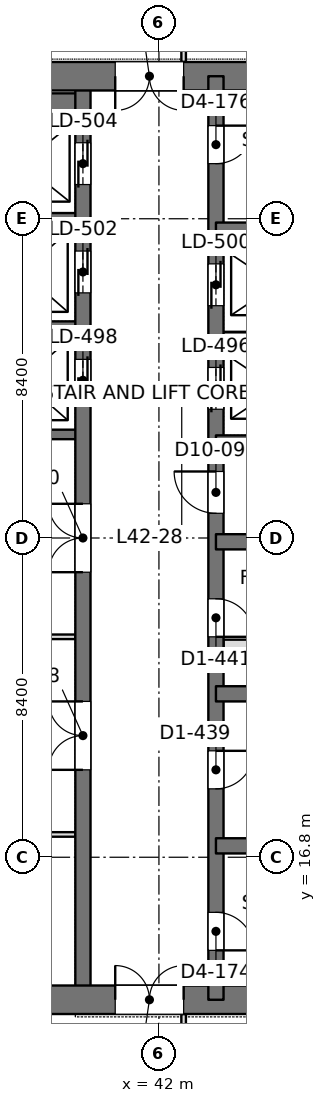
"""IFC4 building model, lengths in metres.
Left out: names, types, materials, properties, quantities, classifications, styles, units other than length and angle.
Written with IfcOpenShell. Run it as: python <this file> out.ifc"""

import sys

from ifc_helpers import new_model, si_unit, direction, frame, frame_2d, origin, place, context, subcontext, project, spatial, rectangle, extrude, element, fill, save


model = new_model("IFC4")
c1 = context("Model", 3, precision=1e-05, world=origin(), true_north=direction((0.0, 1.0)))
c2 = subcontext(c1, "Body", "Model", "MODEL_VIEW")
j1 = project(units=[si_unit("LENGTHUNIT", "METRE"), si_unit("PLANEANGLEUNIT", "RADIAN")], contexts=[c1])
p1 = place(None, origin())
s1 = spatial("IfcSite", under=j1, at=p1, CompositionType="ELEMENT")
p2 = place(p1, origin())
s2 = spatial("IfcBuilding", under=s1, at=p2, CompositionType="ELEMENT")
p3 = place(p2, frame((0.0, 0.0, 186.0)))
s3 = spatial("IfcBuildingStorey", under=s2, at=p3, CompositionType="ELEMENT", Elevation=186.0)
p4 = place(p3, frame((33.675, 13.05, 0.0), z_axis=(0.0, 0.0, 1.0), x_axis=(1.0, 0.0, 0.0)))
e1 = element("IfcWall", 1, at=p4, inside=s3, PredefinedType="SHEAR", context=c2, shape_type="SweptSolid", body=[
    extrude(rectangle(XDim=17.85, YDim=0.75, at=frame_2d((8.925, 0.0))), origin(), (0.0, 0.0, 1.0), 4.2),
])
p5 = place(p4, frame((7.175, 0.0, 0.0)))
e2 = element("IfcOpeningElement", 2, at=p5, cuts=e1, PredefinedType="OPENING", context=c2, shape_type="SweptSolid", body=[
    extrude(rectangle(XDim=1.8, YDim=2.4, at=frame_2d((0.9, 1.2))), frame((0.0, 0.385, 0.0), z_axis=(0.0, -1.0, 0.0), x_axis=(1.0, 0.0, 0.0)), (0.0, 0.0, 1.0), 0.77),
])
p6 = place(p3, frame((33.675, 37.35, 0.0), z_axis=(0.0, 0.0, 1.0), x_axis=(1.0, 0.0, 0.0)))
e3 = element("IfcWall", 3, at=p6, inside=s3, PredefinedType="SHEAR", context=c2, shape_type="SweptSolid", body=[
    extrude(rectangle(XDim=17.85, YDim=0.75, at=frame_2d((8.925, 0.0))), origin(), (0.0, 0.0, 1.0), 4.2),
])
p7 = place(p6, frame((7.175, 0.0, 0.0)))
e4 = element("IfcOpeningElement", 4, at=p7, cuts=e3, PredefinedType="OPENING", context=c2, shape_type="SweptSolid", body=[
    extrude(rectangle(XDim=1.8, YDim=2.4, at=frame_2d((0.9, 1.2))), frame((0.0, 0.385, 0.0), z_axis=(0.0, -1.0, 0.0), x_axis=(1.0, 0.0, 0.0)), (0.0, 0.0, 1.0), 0.77),
])
p8 = place(p3, frame((43.5, 13.05, 0.0), z_axis=(0.0, 0.0, 1.0), x_axis=(0.0, 1.0, 0.0)))
e5 = element("IfcWall", 5, at=p8, inside=s3, PredefinedType="SHEAR", context=c2, shape_type="SweptSolid", body=[
    extrude(rectangle(XDim=24.3, YDim=0.4, at=frame_2d((12.15, 0.0))), origin(), (0.0, 0.0, 1.0), 4.2),
])
p9 = place(p8, frame((1.3, 0.0, 0.0)))
e6 = element("IfcOpeningElement", 6, at=p9, cuts=e5, PredefinedType="OPENING", context=c2, shape_type="SweptSolid", body=[
    extrude(rectangle(XDim=1.0, YDim=2.2, at=frame_2d((0.5, 1.1))), frame((0.0, 0.21, 0.0), z_axis=(0.0, -1.0, 0.0), x_axis=(1.0, 0.0, 0.0)), (0.0, 0.0, 1.0), 0.42),
])
p10 = place(p8, frame((22.0, 0.0, 0.0)))
e7 = element("IfcOpeningElement", 7, at=p10, cuts=e5, PredefinedType="OPENING", context=c2, shape_type="SweptSolid", body=[
    extrude(rectangle(XDim=1.0, YDim=2.2, at=frame_2d((0.5, 1.1))), frame((0.0, 0.21, 0.0), z_axis=(0.0, -1.0, 0.0), x_axis=(1.0, 0.0, 0.0)), (0.0, 0.0, 1.0), 0.42),
])
p11 = place(p8, frame((5.55, 0.0, 0.0)))
e8 = element("IfcOpeningElement", 8, at=p11, cuts=e5, PredefinedType="OPENING", context=c2, shape_type="SweptSolid", body=[
    extrude(rectangle(XDim=1.0, YDim=2.2, at=frame_2d((0.5, 1.1))), frame((0.0, 0.21, 0.0), z_axis=(0.0, -1.0, 0.0), x_axis=(1.0, 0.0, 0.0)), (0.0, 0.0, 1.0), 0.42),
])
p12 = place(p8, frame((9.55, 0.0, 0.0)))
e9 = element("IfcOpeningElement", 9, at=p12, cuts=e5, PredefinedType="OPENING", context=c2, shape_type="SweptSolid", body=[
    extrude(rectangle(XDim=1.0, YDim=2.2, at=frame_2d((0.5, 1.1))), frame((0.0, 0.21, 0.0), z_axis=(0.0, -1.0, 0.0), x_axis=(1.0, 0.0, 0.0)), (0.0, 0.0, 1.0), 0.42),
])
p13 = place(p8, frame((12.8, 0.0, 0.0)))
e10 = element("IfcOpeningElement", 10, at=p13, cuts=e5, PredefinedType="OPENING", context=c2, shape_type="SweptSolid", body=[
    extrude(rectangle(XDim=1.1, YDim=2.2, at=frame_2d((0.55, 1.1))), frame((0.0, 0.21, 0.0), z_axis=(0.0, -1.0, 0.0), x_axis=(1.0, 0.0, 0.0)), (0.0, 0.0, 1.0), 0.42),
])
p14 = place(p8, frame((15.538, 0.0, 0.0)))
e11 = element("IfcOpeningElement", 11, at=p14, cuts=e5, PredefinedType="OPENING", context=c2, shape_type="SweptSolid", body=[
    extrude(rectangle(XDim=1.1, YDim=2.2, at=frame_2d((0.55, 1.1))), frame((0.0, 0.21, 0.0), z_axis=(0.0, -1.0, 0.0), x_axis=(1.0, 0.0, 0.0)), (0.0, 0.0, 1.0), 0.42),
])
p15 = place(p8, frame((18.262, 0.0, 0.0)))
e12 = element("IfcOpeningElement", 12, at=p15, cuts=e5, PredefinedType="OPENING", context=c2, shape_type="SweptSolid", body=[
    extrude(rectangle(XDim=1.1, YDim=2.2, at=frame_2d((0.55, 1.1))), frame((0.0, 0.21, 0.0), z_axis=(0.0, -1.0, 0.0), x_axis=(1.0, 0.0, 0.0)), (0.0, 0.0, 1.0), 0.42),
])
p16 = place(p3, frame((40.0, 13.05, 0.0), z_axis=(0.0, 0.0, 1.0), x_axis=(0.0, 1.0, 0.0)))
e13 = element("IfcWall", 13, at=p16, inside=s3, PredefinedType="SHEAR", context=c2, shape_type="SweptSolid", body=[
    extrude(rectangle(XDim=24.3, YDim=0.4, at=frame_2d((12.15, 0.0))), origin(), (0.0, 0.0, 1.0), 4.2),
])
p17 = place(p16, frame((15.75, 0.0, 0.0)))
e14 = element("IfcOpeningElement", 14, at=p17, cuts=e13, PredefinedType="OPENING", context=c2, shape_type="SweptSolid", body=[
    extrude(rectangle(XDim=1.1, YDim=2.2, at=frame_2d((0.55, 1.1))), frame((0.0, 0.21, 0.0), z_axis=(0.0, -1.0, 0.0), x_axis=(1.0, 0.0, 0.0)), (0.0, 0.0, 1.0), 0.42),
])
p18 = place(p16, frame((18.6, 0.0, 0.0)))
e15 = element("IfcOpeningElement", 15, at=p18, cuts=e13, PredefinedType="OPENING", context=c2, shape_type="SweptSolid", body=[
    extrude(rectangle(XDim=1.1, YDim=2.2, at=frame_2d((0.55, 1.1))), frame((0.0, 0.21, 0.0), z_axis=(0.0, -1.0, 0.0), x_axis=(1.0, 0.0, 0.0)), (0.0, 0.0, 1.0), 0.42),
])
p19 = place(p16, frame((21.45, 0.0, 0.0)))
e16 = element("IfcOpeningElement", 16, at=p19, cuts=e13, PredefinedType="OPENING", context=c2, shape_type="SweptSolid", body=[
    extrude(rectangle(XDim=1.1, YDim=2.2, at=frame_2d((0.55, 1.1))), frame((0.0, 0.21, 0.0), z_axis=(0.0, -1.0, 0.0), x_axis=(1.0, 0.0, 0.0)), (0.0, 0.0, 1.0), 0.42),
])
p20 = place(p16, frame((6.05, 0.0, 0.0)))
e17 = element("IfcOpeningElement", 17, at=p20, cuts=e13, PredefinedType="OPENING", context=c2, shape_type="SweptSolid", body=[
    extrude(rectangle(XDim=1.8, YDim=2.4, at=frame_2d((0.9, 1.2))), frame((0.0, 0.21, 0.0), z_axis=(0.0, -1.0, 0.0), x_axis=(1.0, 0.0, 0.0)), (0.0, 0.0, 1.0), 0.42),
])
p21 = place(p16, frame((11.25, 0.0, 0.0)))
e18 = element("IfcOpeningElement", 18, at=p21, cuts=e13, PredefinedType="OPENING", context=c2, shape_type="SweptSolid", body=[
    extrude(rectangle(XDim=1.8, YDim=2.4, at=frame_2d((0.9, 1.2))), frame((0.0, 0.21, 0.0), z_axis=(0.0, -1.0, 0.0), x_axis=(1.0, 0.0, 0.0)), (0.0, 0.0, 1.0), 0.42),
])
for number, where, z_axis, x_axis in (
    (19, (51.15, 17.1, 0.0), (0.0, 0.0, 1.0), (-1.0, 0.0, 0.0)),
    (20, (51.15, 21.1, 0.0), (0.0, 0.0, 1.0), (-1.0, 0.0, 0.0)),
    (21, (51.15, 25.1, 0.0), (0.0, 0.0, 1.0), (-1.0, 0.0, 0.0)),
    (22, (51.15, 27.7, 0.0), (0.0, 0.0, 1.0), (-1.0, 0.0, 0.0)),
    (23, (51.15, 33.3, 0.0), (0.0, 0.0, 1.0), (-1.0, 0.0, 0.0)),
):
    element("IfcWall", number, at=place(p3, frame(where, z_axis=z_axis, x_axis=x_axis)), inside=s3, PredefinedType="SHEAR", context=c2, shape_type="SweptSolid", body=[
        extrude(rectangle(XDim=7.65, YDim=0.4, at=frame_2d((3.825, 0.0))), origin(), (0.0, 0.0, 1.0), 4.2),
    ])
p22 = place(p3, frame((46.7, 30.5, 0.0), z_axis=(0.0, 0.0, 1.0), x_axis=(-1.0, 0.0, 0.0)))
e24 = element("IfcWall", 24, at=p22, inside=s3, PredefinedType="SHEAR", context=c2, shape_type="SweptSolid", body=[
    extrude(rectangle(XDim=3.2, YDim=0.25, at=frame_2d((1.6, 0.0))), origin(), (0.0, 0.0, 1.0), 4.2),
])
p23 = place(p3, frame((40.0, 27.925, 0.0), z_axis=(0.0, 0.0, 1.0), x_axis=(-1.0, 0.0, 0.0)))
e25 = element("IfcWall", 25, at=p23, inside=s3, PredefinedType="SHEAR", context=c2, shape_type="SweptSolid", body=[
    extrude(rectangle(XDim=5.95, YDim=0.25, at=frame_2d((2.975, 0.0))), origin(), (0.0, 0.0, 1.0), 4.2),
])
for number, where, z_axis, x_axis in (
    (26, (40.0, 30.775, 0.0), (0.0, 0.0, 1.0), (-1.0, 0.0, 0.0)),
    (27, (40.0, 33.625, 0.0), (0.0, 0.0, 1.0), (-1.0, 0.0, 0.0)),
):
    element("IfcWall", number, at=place(p3, frame(where, z_axis=z_axis, x_axis=x_axis)), inside=s3, PredefinedType="SHEAR", context=c2, shape_type="SweptSolid", body=[
        extrude(rectangle(XDim=3.2, YDim=0.25, at=frame_2d((1.6, 0.0))), origin(), (0.0, 0.0, 1.0), 4.2),
    ])
p24 = place(p3, frame((40.0, 36.625, 0.0), z_axis=(0.0, 0.0, 1.0), x_axis=(-1.0, 0.0, 0.0)))
e28 = element("IfcWall", 28, at=p24, inside=s3, PredefinedType="SHEAR", context=c2, shape_type="SweptSolid", body=[
    extrude(rectangle(XDim=3.2, YDim=0.55, at=frame_2d((1.6, 0.0))), origin(), (0.0, 0.0, 1.0), 4.2),
])
p25 = place(p3, frame((33.898, 17.4, 0.0), z_axis=(0.0, 0.0, 1.0), x_axis=(1.0, 0.0, 0.0)))
e29 = element("IfcWall", 29, at=p25, inside=s3, PredefinedType="PARTITIONING", context=c2, shape_type="SweptSolid", body=[
    extrude(rectangle(XDim=5.904, YDim=0.12, at=frame_2d((2.952, 0.0))), origin(), (0.0, 0.0, 1.0), 3.55),
])
p26 = place(p3, frame((34.749, 22.6, 0.0), z_axis=(0.0, 0.0, 1.0), x_axis=(1.0, 0.0, 0.0)))
e30 = element("IfcWall", 30, at=p26, inside=s3, PredefinedType="PARTITIONING", context=c2, shape_type="SweptSolid", body=[
    extrude(rectangle(XDim=5.053, YDim=0.12, at=frame_2d((2.526, 0.0))), origin(), (0.0, 0.0, 1.0), 4.05),
])
p27 = place(p3, frame((42.65, 11.158, 0.0), z_axis=(0.0, 0.0, 1.0), x_axis=(0.0, 1.0, 0.0)))
e31 = element("IfcWall", 31, at=p27, inside=s3, PredefinedType="PARTITIONING", context=c2, shape_type="SweptSolid", body=[
    extrude(rectangle(XDim=1.518, YDim=0.12, at=frame_2d((0.759, 0.0))), origin(), (0.0, 0.0, 1.0), 4.05),
])
p28 = place(p27, frame((0.192, 0.0, 0.0)))
e32 = element("IfcOpeningElement", 32, at=p28, cuts=e31, PredefinedType="OPENING", context=c2, shape_type="SweptSolid", body=[
    extrude(rectangle(XDim=1.0, YDim=2.4, at=frame_2d((0.5, 1.2))), frame((0.0, 0.07, 0.0), z_axis=(0.0, -1.0, 0.0), x_axis=(1.0, 0.0, 0.0)), (0.0, 0.0, 1.0), 0.14),
])
p29 = place(p3, frame((42.65, 37.724, 0.0), z_axis=(0.0, 0.0, 1.0), x_axis=(0.0, 1.0, 0.0)))
e33 = element("IfcWall", 33, at=p29, inside=s3, PredefinedType="PARTITIONING", context=c2, shape_type="SweptSolid", body=[
    extrude(rectangle(XDim=1.518, YDim=0.12, at=frame_2d((0.759, 0.0))), origin(), (0.0, 0.0, 1.0), 4.05),
])
p30 = place(p29, frame((0.326, 0.0, 0.0)))
e34 = element("IfcOpeningElement", 34, at=p30, cuts=e33, PredefinedType="OPENING", context=c2, shape_type="SweptSolid", body=[
    extrude(rectangle(XDim=1.0, YDim=2.4, at=frame_2d((0.5, 1.2))), frame((0.0, 0.07, 0.0), z_axis=(0.0, -1.0, 0.0), x_axis=(1.0, 0.0, 0.0)), (0.0, 0.0, 1.0), 0.14),
])
p31 = place(p3, frame((43.7, 22.4, 0.0), z_axis=(0.0, 0.0, 1.0), x_axis=(1.0, 0.0, 0.0)))
e35 = element("IfcWall", 35, at=p31, inside=s3, PredefinedType="PARTITIONING", context=c2, shape_type="SweptSolid", body=[
    extrude(rectangle(XDim=6.675, YDim=0.25, at=frame_2d((3.337, 0.0))), origin(), (0.0, 0.0, 1.0), 4.0),
])
p32 = place(p31, frame((2.863, 0.0, 0.0)))
e36 = element("IfcOpeningElement", 36, at=p32, cuts=e35, PredefinedType="OPENING", context=c2, shape_type="SweptSolid", body=[
    extrude(rectangle(XDim=0.9, YDim=2.2, at=frame_2d((0.45, 1.1))), frame((0.0, 0.135, 0.0), z_axis=(0.0, -1.0, 0.0), x_axis=(1.0, 0.0, 0.0)), (0.0, 0.0, 1.0), 0.27),
])
p33 = place(p5, origin())
e37 = element("IfcDoor", 37, at=p33, inside=s3, OperationType="DOUBLE_DOOR_SINGLE_SWING", PredefinedType="DOOR", context=c2, shape_type="SweptSolid", body=[
    extrude(rectangle(XDim=1.8, YDim=2.4, at=frame_2d((0.9, 1.2))), frame((0.0, 0.025, 0.0), z_axis=(0.0, -1.0, 0.0), x_axis=(1.0, 0.0, 0.0)), (0.0, 0.0, 1.0), 0.05),
])
fill(e2, e37)
p34 = place(p7, frame((1.8, 0.0, 0.0), z_axis=(0.0, 0.0, 1.0), x_axis=(-1.0, 0.0, 0.0)))
e38 = element("IfcDoor", 38, at=p34, inside=s3, OperationType="DOUBLE_DOOR_SINGLE_SWING", PredefinedType="DOOR", context=c2, shape_type="SweptSolid", body=[
    extrude(rectangle(XDim=1.8, YDim=2.4, at=frame_2d((0.9, 1.2))), frame((0.0, 0.025, 0.0), z_axis=(0.0, -1.0, 0.0), x_axis=(1.0, 0.0, 0.0)), (0.0, 0.0, 1.0), 0.05),
])
fill(e4, e38)
p35 = place(p9, frame((1.0, 0.0, 0.0), z_axis=(0.0, 0.0, 1.0), x_axis=(-1.0, 0.0, 0.0)))
e39 = element("IfcDoor", 39, at=p35, inside=s3, OperationType="SINGLE_SWING_RIGHT", PredefinedType="DOOR", context=c2, shape_type="SweptSolid", body=[
    extrude(rectangle(XDim=1.0, YDim=2.2, at=frame_2d((0.5, 1.1))), frame((0.0, 0.025, 0.0), z_axis=(0.0, -1.0, 0.0), x_axis=(1.0, 0.0, 0.0)), (0.0, 0.0, 1.0), 0.05),
])
fill(e6, e39)
p36 = place(p10, frame((1.0, 0.0, 0.0), z_axis=(0.0, 0.0, 1.0), x_axis=(-1.0, 0.0, 0.0)))
e40 = element("IfcDoor", 40, at=p36, inside=s3, OperationType="SINGLE_SWING_LEFT", PredefinedType="DOOR", context=c2, shape_type="SweptSolid", body=[
    extrude(rectangle(XDim=1.0, YDim=2.2, at=frame_2d((0.5, 1.1))), frame((0.0, 0.025, 0.0), z_axis=(0.0, -1.0, 0.0), x_axis=(1.0, 0.0, 0.0)), (0.0, 0.0, 1.0), 0.05),
])
fill(e7, e40)
p37 = place(p11, frame((1.0, 0.0, 0.0), z_axis=(0.0, 0.0, 1.0), x_axis=(-1.0, 0.0, 0.0)))
e41 = element("IfcDoor", 41, at=p37, inside=s3, OperationType="SINGLE_SWING_LEFT", PredefinedType="DOOR", context=c2, shape_type="SweptSolid", body=[
    extrude(rectangle(XDim=1.0, YDim=2.2, at=frame_2d((0.5, 1.1))), frame((0.0, 0.025, 0.0), z_axis=(0.0, -1.0, 0.0), x_axis=(1.0, 0.0, 0.0)), (0.0, 0.0, 1.0), 0.05),
])
fill(e8, e41)
p38 = place(p12, frame((1.0, 0.0, 0.0), z_axis=(0.0, 0.0, 1.0), x_axis=(-1.0, 0.0, 0.0)))
e42 = element("IfcDoor", 42, at=p38, inside=s3, OperationType="SINGLE_SWING_RIGHT", PredefinedType="DOOR", context=c2, shape_type="SweptSolid", body=[
    extrude(rectangle(XDim=1.0, YDim=2.2, at=frame_2d((0.5, 1.1))), frame((0.0, 0.025, 0.0), z_axis=(0.0, -1.0, 0.0), x_axis=(1.0, 0.0, 0.0)), (0.0, 0.0, 1.0), 0.05),
])
fill(e9, e42)
p39 = place(p13, origin())
e43 = element("IfcDoor", 43, at=p39, inside=s3, OperationType="SINGLE_SWING_RIGHT", PredefinedType="DOOR", context=c2, shape_type="SweptSolid", body=[
    extrude(rectangle(XDim=1.1, YDim=2.2, at=frame_2d((0.55, 1.1))), frame((0.0, 0.025, 0.0), z_axis=(0.0, -1.0, 0.0), x_axis=(1.0, 0.0, 0.0)), (0.0, 0.0, 1.0), 0.05),
])
fill(e10, e43)
p40 = place(p17, origin())
e44 = element("IfcDoor", 44, at=p40, inside=s3, OperationType="DOUBLE_DOOR_SLIDING", PredefinedType="DOOR", context=c2, shape_type="SweptSolid", body=[
    extrude(rectangle(XDim=1.1, YDim=2.2, at=frame_2d((0.55, 1.1))), frame((0.0, 0.025, 0.0), z_axis=(0.0, -1.0, 0.0), x_axis=(1.0, 0.0, 0.0)), (0.0, 0.0, 1.0), 0.05),
])
fill(e14, e44)
p41 = place(p18, origin())
e45 = element("IfcDoor", 45, at=p41, inside=s3, OperationType="DOUBLE_DOOR_SLIDING", PredefinedType="DOOR", context=c2, shape_type="SweptSolid", body=[
    extrude(rectangle(XDim=1.1, YDim=2.2, at=frame_2d((0.55, 1.1))), frame((0.0, 0.025, 0.0), z_axis=(0.0, -1.0, 0.0), x_axis=(1.0, 0.0, 0.0)), (0.0, 0.0, 1.0), 0.05),
])
fill(e15, e45)
p42 = place(p19, origin())
e46 = element("IfcDoor", 46, at=p42, inside=s3, OperationType="DOUBLE_DOOR_SLIDING", PredefinedType="DOOR", context=c2, shape_type="SweptSolid", body=[
    extrude(rectangle(XDim=1.1, YDim=2.2, at=frame_2d((0.55, 1.1))), frame((0.0, 0.025, 0.0), z_axis=(0.0, -1.0, 0.0), x_axis=(1.0, 0.0, 0.0)), (0.0, 0.0, 1.0), 0.05),
])
fill(e16, e46)
p43 = place(p14, origin())
e47 = element("IfcDoor", 47, at=p43, inside=s3, OperationType="DOUBLE_DOOR_SLIDING", PredefinedType="DOOR", context=c2, shape_type="SweptSolid", body=[
    extrude(rectangle(XDim=1.1, YDim=2.2, at=frame_2d((0.55, 1.1))), frame((0.0, 0.025, 0.0), z_axis=(0.0, -1.0, 0.0), x_axis=(1.0, 0.0, 0.0)), (0.0, 0.0, 1.0), 0.05),
])
fill(e11, e47)
p44 = place(p15, origin())
e48 = element("IfcDoor", 48, at=p44, inside=s3, OperationType="DOUBLE_DOOR_SLIDING", PredefinedType="DOOR", context=c2, shape_type="SweptSolid", body=[
    extrude(rectangle(XDim=1.1, YDim=2.2, at=frame_2d((0.55, 1.1))), frame((0.0, 0.025, 0.0), z_axis=(0.0, -1.0, 0.0), x_axis=(1.0, 0.0, 0.0)), (0.0, 0.0, 1.0), 0.05),
])
fill(e12, e48)
p45 = place(p20, origin())
e49 = element("IfcDoor", 49, at=p45, inside=s3, OperationType="DOUBLE_DOOR_SINGLE_SWING", PredefinedType="DOOR", context=c2, shape_type="SweptSolid", body=[
    extrude(rectangle(XDim=1.8, YDim=2.4, at=frame_2d((0.9, 1.2))), frame((0.0, 0.025, 0.0), z_axis=(0.0, -1.0, 0.0), x_axis=(1.0, 0.0, 0.0)), (0.0, 0.0, 1.0), 0.05),
])
fill(e17, e49)
p46 = place(p21, origin())
e50 = element("IfcDoor", 50, at=p46, inside=s3, OperationType="DOUBLE_DOOR_SINGLE_SWING", PredefinedType="DOOR", context=c2, shape_type="SweptSolid", body=[
    extrude(rectangle(XDim=1.8, YDim=2.4, at=frame_2d((0.9, 1.2))), frame((0.0, 0.025, 0.0), z_axis=(0.0, -1.0, 0.0), x_axis=(1.0, 0.0, 0.0)), (0.0, 0.0, 1.0), 0.05),
])
fill(e18, e50)
save(model, sys.argv[1])
